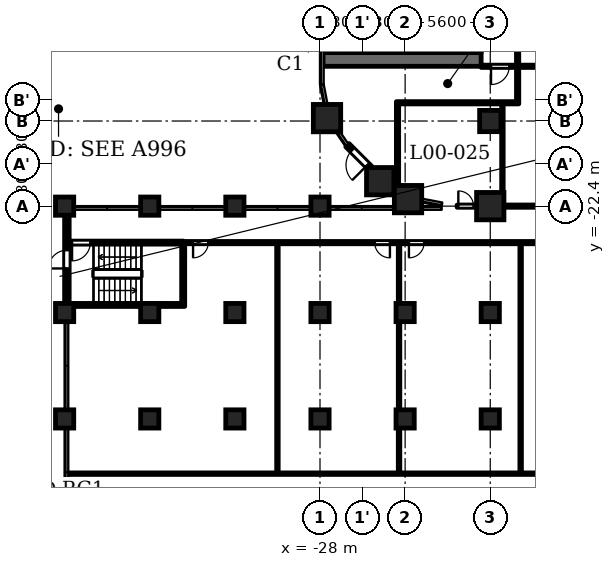
"""IFC4 building model, lengths in metres.
Left out: names, types, materials, properties, quantities, classifications, styles, units other than length and angle.
Written with IfcOpenShell. Run it as: python <this file> out.ifc"""

import sys

from ifc_helpers import new_model, si_unit, direction, frame, frame_2d, origin, origin_2d, place, context, subcontext, project, spatial, polyline, rectangle, circle, outline, extrude, element, fill, save


model = new_model("IFC4")
c1 = context("Model", 3, precision=1e-05, world=origin(), true_north=direction((0.0, 1.0)))
c2 = subcontext(c1, "Body", "Model", "MODEL_VIEW")
j1 = project(units=[si_unit("LENGTHUNIT", "METRE"), si_unit("PLANEANGLEUNIT", "RADIAN")], contexts=[c1])
p1 = place(None, origin())
s1 = spatial("IfcSite", under=j1, at=p1, CompositionType="ELEMENT")
p2 = place(p1, origin())
s2 = spatial("IfcBuilding", under=s1, at=p2, CompositionType="ELEMENT")
p3 = place(p2, origin())
s3 = spatial("IfcBuildingStorey", under=s2, at=p3, CompositionType="ELEMENT", Elevation=0.0)
for number, where, z_axis, x_axis in (
    (1, (-22.209, -21.938, 0.0), (0.0, 0.0, 1.0), (1.0, 0.0, 0.0)),
    (2, (-16.8, -22.4, 0.0), (0.0, 0.0, 1.0), (1.0, 0.0, 0.0)),
    (3, (-27.538, -16.609, 0.0), (0.0, 0.0, 1.0), (1.0, 0.0, 0.0)),
    (4, (-24.04, -20.76, 0.0), (0.0, 0.0, 1.0), (1.0, 0.0, 0.0)),
):
    element("IfcColumn", number, at=place(p3, frame(where, z_axis=z_axis, x_axis=x_axis)), inside=s3, PredefinedType="COLUMN", context=c2, shape_type="SweptSolid", body=[
        extrude(rectangle(XDim=1.8, YDim=1.8, at=origin_2d()), origin(), (0.0, 0.0, 1.0), 6.5),
    ])
p4 = place(p3, frame((-16.8, -16.8, 0.0), z_axis=(0.0, 0.0, 1.0), x_axis=(1.0, 0.0, 0.0)))
e5 = element("IfcColumn", 5, at=p4, inside=s3, PredefinedType="COLUMN", context=c2, shape_type="SweptSolid", body=[
    extrude(rectangle(XDim=1.4, YDim=1.4, at=origin_2d()), origin(), (0.0, 0.0, 1.0), 6.5),
])
for number, where, z_axis, x_axis in (
    (6, (-44.8, -29.4, 0.0), (0.0, 0.0, 1.0), (1.0, 0.0, 0.0)),
    (7, (-39.2, -29.4, 0.0), (0.0, 0.0, 1.0), (1.0, 0.0, 0.0)),
    (8, (-33.6, -29.4, 0.0), (0.0, 0.0, 1.0), (1.0, 0.0, 0.0)),
    (9, (-28.0, -29.4, 0.0), (0.0, 0.0, 1.0), (1.0, 0.0, 0.0)),
    (10, (-22.4, -29.4, 0.0), (0.0, 0.0, 1.0), (1.0, 0.0, 0.0)),
    (11, (-16.8, -29.4, 0.0), (0.0, 0.0, 1.0), (1.0, 0.0, 0.0)),
    (12, (-44.8, -36.4, 0.0), (0.0, 0.0, 1.0), (1.0, 0.0, 0.0)),
    (13, (-39.2, -36.4, 0.0), (0.0, 0.0, 1.0), (1.0, 0.0, 0.0)),
    (14, (-33.6, -36.4, 0.0), (0.0, 0.0, 1.0), (1.0, 0.0, 0.0)),
    (15, (-28.0, -36.4, 0.0), (0.0, 0.0, 1.0), (1.0, 0.0, 0.0)),
    (16, (-22.4, -36.4, 0.0), (0.0, 0.0, 1.0), (1.0, 0.0, 0.0)),
    (17, (-16.8, -36.4, 0.0), (0.0, 0.0, 1.0), (1.0, 0.0, 0.0)),
    (18, (-44.8, -22.4, 0.0), (0.0, 0.0, 1.0), (1.0, 0.0, 0.0)),
    (19, (-39.2, -22.4, 0.0), (0.0, 0.0, 1.0), (1.0, 0.0, 0.0)),
    (20, (-33.6, -22.4, 0.0), (0.0, 0.0, 1.0), (1.0, 0.0, 0.0)),
    (21, (-28.0, -22.4, 0.0), (0.0, 0.0, 1.0), (1.0, 0.0, 0.0)),
):
    element("IfcColumn", number, at=place(p3, frame(where, z_axis=z_axis, x_axis=x_axis)), inside=s3, PredefinedType="COLUMN", context=c2, shape_type="SweptSolid", body=[
        extrude(circle(Radius=0.6, at=origin_2d()), origin(), (0.0, 0.0, 1.0), 6.5),
    ])
p5 = place(p3, frame((-24.571, -20.017, 0.0), z_axis=(0.0, 0.0, 1.0), x_axis=(-0.707053705054, 0.707159853336, 0.0)))
e22 = element("IfcWall", 22, at=p5, inside=s3, PredefinedType="SOLIDWALL", context=c2, shape_type="SweptSolid", body=[
    extrude(rectangle(XDim=2.3, YDim=0.3, at=frame_2d((1.15, 0.0))), origin(), (0.0, 0.0, 1.0), 5.25),
])
p6 = place(p5, frame((0.45, 0.0, 0.0)))
e23 = element("IfcOpeningElement", 23, at=p6, cuts=e22, PredefinedType="OPENING", context=c2, shape_type="SweptSolid", body=[
    extrude(rectangle(XDim=1.4, YDim=2.1, at=frame_2d((0.7, 1.05))), frame((0.0, 0.16, 0.0), z_axis=(0.0, -1.0, 0.0), x_axis=(1.0, 0.0, 0.0)), (0.0, 0.0, 1.0), 0.32),
])
p7 = place(p3, frame((-44.65, -28.8, 0.0), z_axis=(0.0, 0.0, 1.0), x_axis=(0.0, 1.0, 0.0)))
e24 = element("IfcWall", 24, at=p7, inside=s3, PredefinedType="SOLIDWALL", context=c2, shape_type="SweptSolid", body=[
    extrude(rectangle(XDim=5.8, YDim=0.3, at=frame_2d((2.9, 0.0))), origin(), (0.0, 0.0, 1.0), 5.35),
])
p8 = place(p7, frame((2.3, 0.0, 0.0)))
e25 = element("IfcOpeningElement", 25, at=p8, cuts=e24, PredefinedType="OPENING", context=c2, shape_type="SweptSolid", body=[
    extrude(rectangle(XDim=1.2, YDim=2.1, at=frame_2d((0.6, 1.05))), frame((0.0, 0.16, 0.0), z_axis=(0.0, -1.0, 0.0), x_axis=(1.0, 0.0, 0.0)), (0.0, 0.0, 1.0), 0.32),
])
p9 = place(p3, frame((-17.4, -12.75, 0.0), z_axis=(0.0, 0.0, 1.0), x_axis=(-1.0, 0.0, 0.0)))
e26 = element("IfcWall", 26, at=p9, inside=s3, PredefinedType="SHEAR", context=c2, shape_type="SweptSolid", body=[
    extrude(rectangle(XDim=10.4, YDim=0.9, at=frame_2d((5.2, 0.0))), origin(), (0.0, 0.0, 1.0), 6.15),
])
p10 = place(p3, frame((-17.6, -12.3, 0.0), z_axis=(0.0, 0.0, 1.0), x_axis=(0.0, 1.0, 0.0)))
e27 = element("IfcWall", 27, at=p10, inside=s3, PredefinedType="SHEAR", context=c2, shape_type="SweptSolid", body=[
    extrude(rectangle(XDim=24.6, YDim=0.4, at=frame_2d((12.3, 0.0))), origin(), (0.0, 0.0, 1.0), 6.15),
])
p11 = place(p10, frame((6.0, 0.0, 0.0)))
e28 = element("IfcOpeningElement", 28, at=p11, cuts=e27, PredefinedType="OPENING", context=c2, shape_type="SweptSolid", body=[
    extrude(rectangle(XDim=1.1, YDim=2.1, at=frame_2d((0.55, 1.05))), frame((0.0, 0.21, 0.0), z_axis=(0.0, -1.0, 0.0), x_axis=(1.0, 0.0, 0.0)), (0.0, 0.0, 1.0), 0.42),
])
p12 = place(p10, frame((8.4, 0.0, 0.0)))
e29 = element("IfcOpeningElement", 29, at=p12, cuts=e27, PredefinedType="OPENING", context=c2, shape_type="SweptSolid", body=[
    extrude(rectangle(XDim=1.1, YDim=2.1, at=frame_2d((0.55, 1.05))), frame((0.0, 0.21, 0.0), z_axis=(0.0, -1.0, 0.0), x_axis=(1.0, 0.0, 0.0)), (0.0, 0.0, 1.0), 0.42),
])
p13 = place(p10, frame((10.8, 0.0, 0.0)))
e30 = element("IfcOpeningElement", 30, at=p13, cuts=e27, PredefinedType="OPENING", context=c2, shape_type="SweptSolid", body=[
    extrude(rectangle(XDim=1.1, YDim=2.1, at=frame_2d((0.55, 1.05))), frame((0.0, 0.21, 0.0), z_axis=(0.0, -1.0, 0.0), x_axis=(1.0, 0.0, 0.0)), (0.0, 0.0, 1.0), 0.42),
])
p14 = place(p10, frame((16.75, 0.0, 0.0)))
e31 = element("IfcOpeningElement", 31, at=p14, cuts=e27, PredefinedType="OPENING", context=c2, shape_type="SweptSolid", body=[
    extrude(rectangle(XDim=0.9, YDim=2.1, at=frame_2d((0.45, 1.05))), frame((0.0, 0.21, 0.0), z_axis=(0.0, -1.0, 0.0), x_axis=(1.0, 0.0, 0.0)), (0.0, 0.0, 1.0), 0.42),
])
p15 = place(p10, frame((22.8, 0.0, 0.0)))
e32 = element("IfcOpeningElement", 32, at=p15, cuts=e27, PredefinedType="OPENING", context=c2, shape_type="SweptSolid", body=[
    extrude(rectangle(XDim=1.1, YDim=2.1, at=frame_2d((0.55, 1.05))), frame((0.0, 0.21, 0.0), z_axis=(0.0, -1.0, 0.0), x_axis=(1.0, 0.0, 0.0)), (0.0, 0.0, 1.0), 0.42),
])
p16 = place(p10, frame((0.7, 0.0, 0.0)))
e33 = element("IfcOpeningElement", 33, at=p16, cuts=e27, PredefinedType="OPENING", context=c2, shape_type="SweptSolid", body=[
    extrude(rectangle(XDim=1.1, YDim=2.1, at=frame_2d((0.55, 1.05))), frame((0.0, 0.21, 0.0), z_axis=(0.0, -1.0, 0.0), x_axis=(1.0, 0.0, 0.0)), (0.0, 0.0, 1.0), 0.42),
])
p17 = place(p10, frame((12.775, 0.0, 0.0)))
e34 = element("IfcOpeningElement", 34, at=p17, cuts=e27, PredefinedType="OPENING", context=c2, shape_type="SweptSolid", body=[
    extrude(rectangle(XDim=1.8, YDim=2.1, at=frame_2d((0.9, 1.05))), frame((0.0, 0.21, 0.0), z_axis=(0.0, -1.0, 0.0), x_axis=(1.0, 0.0, 0.0)), (0.0, 0.0, 1.0), 0.42),
])
p18 = place(p3, frame((-26.55, -12.3, 0.0), z_axis=(0.0, 0.0, 1.0), x_axis=(0.0, 1.0, 0.0)))
e35 = element("IfcWall", 35, at=p18, inside=s3, PredefinedType="SHEAR", context=c2, shape_type="SweptSolid", body=[
    extrude(rectangle(XDim=24.6, YDim=0.9, at=frame_2d((12.3, 0.0))), origin(), (0.0, 0.0, 1.0), 6.15),
])
p19 = place(p3, frame((-23.55, -12.3, 0.0), z_axis=(0.0, 0.0, 1.0), x_axis=(0.0, 1.0, 0.0)))
e36 = element("IfcWall", 36, at=p19, inside=s3, PredefinedType="PARTITIONING", context=c2, shape_type="SweptSolid", body=[
    extrude(rectangle(XDim=2.5, YDim=0.2, at=frame_2d((1.25, 0.0))), origin(), (0.0, 0.0, 1.0), 6.15),
])
p20 = place(p19, frame((0.8, 0.0, 0.0)))
e37 = element("IfcOpeningElement", 37, at=p20, cuts=e36, PredefinedType="OPENING", context=c2, shape_type="SweptSolid", body=[
    extrude(rectangle(XDim=0.9, YDim=2.1, at=frame_2d((0.45, 1.05))), frame((0.0, 0.11, 0.0), z_axis=(0.0, -1.0, 0.0), x_axis=(1.0, 0.0, 0.0)), (0.0, 0.0, 1.0), 0.22),
])
p21 = place(p3, frame((-44.618, -40.0, 0.0), z_axis=(0.0, 0.0, 1.0), x_axis=(1.0, 0.0, 0.0)))
e38 = element("IfcWall", 38, at=p21, inside=s3, PredefinedType="PARTITIONING", context=c2, shape_type="SweptSolid", body=[
    extrude(rectangle(XDim=40.443, YDim=0.1, at=frame_2d((20.221, 0.0))), origin(), (0.0, 0.0, 1.0), 6.15),
])
p22 = place(p3, frame((-44.71, -28.9, 0.0), z_axis=(0.0, 0.0, 1.0), x_axis=(1.0, 0.0, 0.0)))
e39 = element("IfcWall", 39, at=p22, inside=s3, PredefinedType="SHEAR", context=c2, shape_type="SweptSolid", body=[
    extrude(rectangle(XDim=7.81, YDim=0.2, at=frame_2d((3.905, 0.0))), origin(), (0.0, 0.0, 1.0), 6.15),
])
p23 = place(p3, frame((-37.0, -24.8, 0.0), z_axis=(0.0, 0.0, 1.0), x_axis=(1.0, 0.0, 0.0)))
e40 = element("IfcWall", 40, at=p23, inside=s3, PredefinedType="PARTITIONING", context=c2, shape_type="SweptSolid", body=[
    extrude(rectangle(XDim=34.95, YDim=0.15, at=frame_2d((17.475, 0.0))), origin(), (0.0, 0.0, 1.0), 6.15),
])
p24 = place(p23, frame((0.65, 0.0, 0.0)))
e41 = element("IfcOpeningElement", 41, at=p24, cuts=e40, PredefinedType="OPENING", context=c2, shape_type="SweptSolid", body=[
    extrude(rectangle(XDim=1.0, YDim=2.1, at=frame_2d((0.5, 1.05))), frame((0.0, 0.085, 0.0), z_axis=(0.0, -1.0, 0.0), x_axis=(1.0, 0.0, 0.0)), (0.0, 0.0, 1.0), 0.17),
])
p25 = place(p23, frame((12.6, 0.0, 0.0)))
e42 = element("IfcOpeningElement", 42, at=p25, cuts=e40, PredefinedType="OPENING", context=c2, shape_type="SweptSolid", body=[
    extrude(rectangle(XDim=1.0, YDim=2.1, at=frame_2d((0.5, 1.05))), frame((0.0, 0.085, 0.0), z_axis=(0.0, -1.0, 0.0), x_axis=(1.0, 0.0, 0.0)), (0.0, 0.0, 1.0), 0.17),
])
p26 = place(p23, frame((14.85, 0.0, 0.0)))
e43 = element("IfcOpeningElement", 43, at=p26, cuts=e40, PredefinedType="OPENING", context=c2, shape_type="SweptSolid", body=[
    extrude(rectangle(XDim=1.0, YDim=2.1, at=frame_2d((0.5, 1.05))), frame((0.0, 0.085, 0.0), z_axis=(0.0, -1.0, 0.0), x_axis=(1.0, 0.0, 0.0)), (0.0, 0.0, 1.0), 0.17),
])
p27 = place(p23, frame((31.35, 0.0, 0.0)))
e44 = element("IfcOpeningElement", 44, at=p27, cuts=e40, PredefinedType="OPENING", context=c2, shape_type="SweptSolid", body=[
    extrude(rectangle(XDim=1.0, YDim=2.1, at=frame_2d((0.5, 1.05))), frame((0.0, 0.085, 0.0), z_axis=(0.0, -1.0, 0.0), x_axis=(1.0, 0.0, 0.0)), (0.0, 0.0, 1.0), 0.17),
])
p28 = place(p3, frame((-44.71, -24.8, 0.0), z_axis=(0.0, 0.0, 1.0), x_axis=(1.0, 0.0, 0.0)))
e45 = element("IfcWall", 45, at=p28, inside=s3, PredefinedType="SHEAR", context=c2, shape_type="SweptSolid", body=[
    extrude(rectangle(XDim=7.71, YDim=0.2, at=frame_2d((3.855, 0.0))), origin(), (0.0, 0.0, 1.0), 6.15),
])
p29 = place(p28, frame((0.4, 0.0, 0.0)))
e46 = element("IfcOpeningElement", 46, at=p29, cuts=e45, PredefinedType="OPENING", context=c2, shape_type="SweptSolid", body=[
    extrude(rectangle(XDim=1.2, YDim=2.1, at=frame_2d((0.6, 1.05))), frame((0.0, 0.11, 0.0), z_axis=(0.0, -1.0, 0.0), x_axis=(1.0, 0.0, 0.0)), (0.0, 0.0, 1.0), 0.22),
])
p30 = place(p3, frame((-18.98, -22.4, 0.0), z_axis=(0.0, 0.0, 1.0), x_axis=(1.0, 0.0, 0.0)))
e47 = element("IfcWall", 47, at=p30, inside=s3, PredefinedType="PARTITIONING", context=c2, shape_type="SweptSolid", body=[
    extrude(rectangle(XDim=37.961, YDim=0.15, at=frame_2d((18.98, 0.0))), origin(), (0.0, 0.0, 1.0), 5.25),
])
p31 = place(p30, frame((15.13, 0.0, 0.0)))
e48 = element("IfcOpeningElement", 48, at=p31, cuts=e47, PredefinedType="OPENING", context=c2, shape_type="SweptSolid", body=[
    extrude(rectangle(XDim=1.2, YDim=2.1, at=frame_2d((0.6, 1.05))), frame((0.0, 0.085, 0.0), z_axis=(0.0, -1.0, 0.0), x_axis=(1.0, 0.0, 0.0)), (0.0, 0.0, 1.0), 0.17),
])
p32 = place(p30, frame((0.08, 0.0, 0.0)))
e49 = element("IfcOpeningElement", 49, at=p32, cuts=e47, PredefinedType="OPENING", context=c2, shape_type="SweptSolid", body=[
    extrude(rectangle(XDim=1.0, YDim=2.1, at=frame_2d((0.5, 1.05))), frame((0.0, 0.085, 0.0), z_axis=(0.0, -1.0, 0.0), x_axis=(1.0, 0.0, 0.0)), (0.0, 0.0, 1.0), 0.17),
])
p33 = place(p30, frame((11.33, 0.0, 0.0)))
e50 = element("IfcOpeningElement", 50, at=p33, cuts=e47, PredefinedType="OPENING", context=c2, shape_type="SweptSolid", body=[
    extrude(rectangle(XDim=1.0, YDim=2.1, at=frame_2d((0.5, 1.05))), frame((0.0, 0.085, 0.0), z_axis=(0.0, -1.0, 0.0), x_axis=(1.0, 0.0, 0.0)), (0.0, 0.0, 1.0), 0.17),
])
p34 = place(p30, frame((25.68, 0.0, 0.0)))
e51 = element("IfcOpeningElement", 51, at=p34, cuts=e47, PredefinedType="OPENING", context=c2, shape_type="SweptSolid", body=[
    extrude(rectangle(XDim=0.9, YDim=2.1, at=frame_2d((0.45, 1.05))), frame((0.0, 0.085, 0.0), z_axis=(0.0, -1.0, 0.0), x_axis=(1.0, 0.0, 0.0)), (0.0, 0.0, 1.0), 0.17),
])
p35 = place(p30, frame((28.18, 0.0, 0.0)))
e52 = element("IfcOpeningElement", 52, at=p35, cuts=e47, PredefinedType="OPENING", context=c2, shape_type="SweptSolid", body=[
    extrude(rectangle(XDim=0.9, YDim=2.1, at=frame_2d((0.45, 1.05))), frame((0.0, 0.085, 0.0), z_axis=(0.0, -1.0, 0.0), x_axis=(1.0, 0.0, 0.0)), (0.0, 0.0, 1.0), 0.17),
])
p36 = place(p30, frame((31.68, 0.0, 0.0)))
e53 = element("IfcOpeningElement", 53, at=p36, cuts=e47, PredefinedType="OPENING", context=c2, shape_type="SweptSolid", body=[
    extrude(rectangle(XDim=0.9, YDim=2.1, at=frame_2d((0.45, 1.05))), frame((0.0, 0.085, 0.0), z_axis=(0.0, -1.0, 0.0), x_axis=(1.0, 0.0, 0.0)), (0.0, 0.0, 1.0), 0.17),
])
p37 = place(p30, frame((36.881, 0.0, 0.0)))
e54 = element("IfcOpeningElement", 54, at=p37, cuts=e47, PredefinedType="OPENING", context=c2, shape_type="SweptSolid", body=[
    extrude(rectangle(XDim=1.0, YDim=2.1, at=frame_2d((0.5, 1.05))), frame((0.0, 0.085, 0.0), z_axis=(0.0, -1.0, 0.0), x_axis=(1.0, 0.0, 0.0)), (0.0, 0.0, 1.0), 0.17),
])
p38 = place(p3, frame((-22.975, -15.6, 0.0), z_axis=(0.0, 0.0, 1.0), x_axis=(1.0, 0.0, 0.0)))
e55 = element("IfcWall", 55, at=p38, inside=s3, PredefinedType="PARTITIONING", context=c2, shape_type="SweptSolid", body=[
    extrude(rectangle(XDim=8.05, YDim=0.15, at=frame_2d((4.025, 0.0))), origin(), (0.0, 0.0, 1.0), 6.15),
])
p39 = place(p3, frame((-17.4, -13.2, 0.0), z_axis=(0.0, 0.0, 1.0), x_axis=(1.0, 0.0, 0.0)))
e56 = element("IfcWall", 56, at=p39, inside=s3, PredefinedType="PARTITIONING", context=c2, shape_type="SweptSolid", body=[
    extrude(rectangle(XDim=34.8, YDim=0.15, at=frame_2d((17.4, 0.0))), origin(), (0.0, 0.0, 1.0), 6.15),
])
p40 = place(p39, frame((13.95, 0.0, 0.0)))
e57 = element("IfcOpeningElement", 57, at=p40, cuts=e56, PredefinedType="OPENING", context=c2, shape_type="SweptSolid", body=[
    extrude(rectangle(XDim=1.8, YDim=2.1, at=frame_2d((0.9, 1.05))), frame((0.0, 0.085, 0.0), z_axis=(0.0, -1.0, 0.0), x_axis=(1.0, 0.0, 0.0)), (0.0, 0.0, 1.0), 0.17),
])
p41 = place(p39, frame((33.05, 0.0, 0.0)))
e58 = element("IfcOpeningElement", 58, at=p41, cuts=e56, PredefinedType="OPENING", context=c2, shape_type="SweptSolid", body=[
    extrude(rectangle(XDim=1.2, YDim=2.1, at=frame_2d((0.6, 1.05))), frame((0.0, 0.085, 0.0), z_axis=(0.0, -1.0, 0.0), x_axis=(1.0, 0.0, 0.0)), (0.0, 0.0, 1.0), 0.17),
])
p42 = place(p39, frame((0.65, 0.0, 0.0)))
e59 = element("IfcOpeningElement", 59, at=p42, cuts=e56, PredefinedType="OPENING", context=c2, shape_type="SweptSolid", body=[
    extrude(rectangle(XDim=1.2, YDim=2.1, at=frame_2d((0.6, 1.05))), frame((0.0, 0.085, 0.0), z_axis=(0.0, -1.0, 0.0), x_axis=(1.0, 0.0, 0.0)), (0.0, 0.0, 1.0), 0.17),
])
p43 = place(p3, frame((-37.0, -28.8, 0.0), z_axis=(0.0, 0.0, 1.0), x_axis=(0.0, 1.0, 0.0)))
e60 = element("IfcWall", 60, at=p43, inside=s3, PredefinedType="SHEAR", context=c2, shape_type="SweptSolid", body=[
    extrude(rectangle(XDim=3.925, YDim=0.2, at=frame_2d((1.962, 0.0))), origin(), (0.0, 0.0, 1.0), 6.15),
])
p44 = place(p3, frame((-30.8, -39.95, 0.0), z_axis=(0.0, 0.0, 1.0), x_axis=(0.0, 1.0, 0.0)))
e61 = element("IfcWall", 61, at=p44, inside=s3, PredefinedType="PARTITIONING", context=c2, shape_type="SweptSolid", body=[
    extrude(rectangle(XDim=15.075, YDim=0.1, at=frame_2d((7.538, 0.0))), origin(), (0.0, 0.0, 1.0), 6.15),
])
p45 = place(p3, frame((-22.9, -21.37, 0.0), z_axis=(0.0, 0.0, 1.0), x_axis=(0.0, 1.0, 0.0)))
e62 = element("IfcWall", 62, at=p45, inside=s3, PredefinedType="PARTITIONING", context=c2, shape_type="SweptSolid", body=[
    extrude(rectangle(XDim=5.695, YDim=0.15, at=frame_2d((2.848, 0.0))), origin(), (0.0, 0.0, 1.0), 6.15),
])
p46 = place(p3, frame((-22.8, -39.95, 0.0), z_axis=(0.0, 0.0, 1.0), x_axis=(0.0, 1.0, 0.0)))
e63 = element("IfcWall", 63, at=p46, inside=s3, PredefinedType="PARTITIONING", context=c2, shape_type="SweptSolid", body=[
    extrude(rectangle(XDim=15.075, YDim=0.1, at=frame_2d((7.538, 0.0))), origin(), (0.0, 0.0, 1.0), 6.15),
])
p47 = place(p3, frame((-16.0, -22.325, 0.0), z_axis=(0.0, 0.0, 1.0), x_axis=(0.0, 1.0, 0.0)))
e64 = element("IfcWall", 64, at=p47, inside=s3, PredefinedType="PARTITIONING", context=c2, shape_type="SweptSolid", body=[
    extrude(rectangle(XDim=6.65, YDim=0.1, at=frame_2d((3.325, 0.0))), origin(), (0.0, 0.0, 1.0), 6.15),
])
p48 = place(p3, frame((-15.0, -15.525, 0.0), z_axis=(0.0, 0.0, 1.0), x_axis=(0.0, 1.0, 0.0)))
e65 = element("IfcWall", 65, at=p48, inside=s3, PredefinedType="PARTITIONING", context=c2, shape_type="SweptSolid", body=[
    extrude(rectangle(XDim=2.25, YDim=0.15, at=frame_2d((1.125, 0.0))), origin(), (0.0, 0.0, 1.0), 6.15),
])
p49 = place(p3, frame((-15.0, -13.125, 0.0), z_axis=(0.0, 0.0, 1.0), x_axis=(0.0, 1.0, 0.0)))
e66 = element("IfcWall", 66, at=p49, inside=s3, PredefinedType="PARTITIONING", context=c2, shape_type="SweptSolid", body=[
    extrude(rectangle(XDim=6.356, YDim=0.15, at=frame_2d((3.178, 0.0))), origin(), (0.0, 0.0, 1.0), 6.15),
])
p50 = place(p3, frame((-14.8, -39.95, 0.0), z_axis=(0.0, 0.0, 1.0), x_axis=(0.0, 1.0, 0.0)))
e67 = element("IfcWall", 67, at=p50, inside=s3, PredefinedType="PARTITIONING", context=c2, shape_type="SweptSolid", body=[
    extrude(rectangle(XDim=15.075, YDim=0.1, at=frame_2d((7.538, 0.0))), origin(), (0.0, 0.0, 1.0), 6.15),
])
p51 = place(p3, origin())
e68 = element("IfcWall", 68, at=p51, inside=s3, PredefinedType="SOLIDWALL", context=c2, shape_type="SweptSolid", body=[
    extrude(outline(polyline([(-20.0, -22.7), (-19.0, -22.7), (-19.0, -22.285), (-19.944, -22.105), (-20.0, -22.4), (-20.0, -22.7)])), origin(), (0.0, 0.0, 1.0), 5.25),
])
p52 = place(p6, origin())
e69 = element("IfcDoor", 69, at=p52, inside=s3, OperationType="SINGLE_SWING_LEFT", PredefinedType="DOOR", context=c2, shape_type="SweptSolid", body=[
    extrude(rectangle(XDim=1.4, YDim=2.1, at=frame_2d((0.7, 1.05))), frame((0.0, 0.025, 0.0), z_axis=(0.0, -1.0, 0.0), x_axis=(1.0, 0.0, 0.0)), (0.0, 0.0, 1.0), 0.05),
])
fill(e23, e69)
p53 = place(p8, origin())
e70 = element("IfcDoor", 70, at=p53, inside=s3, OperationType="SINGLE_SWING_LEFT", PredefinedType="DOOR", context=c2, shape_type="SweptSolid", body=[
    extrude(rectangle(XDim=1.2, YDim=2.1, at=frame_2d((0.6, 1.05))), frame((0.0, 0.025, 0.0), z_axis=(0.0, -1.0, 0.0), x_axis=(1.0, 0.0, 0.0)), (0.0, 0.0, 1.0), 0.05),
])
fill(e25, e70)
p54 = place(p29, origin())
e71 = element("IfcDoor", 71, at=p54, inside=s3, OperationType="SINGLE_SWING_LEFT", PredefinedType="DOOR", context=c2, shape_type="SweptSolid", body=[
    extrude(rectangle(XDim=1.2, YDim=2.1, at=frame_2d((0.6, 1.05))), frame((0.0, 0.025, 0.0), z_axis=(0.0, -1.0, 0.0), x_axis=(1.0, 0.0, 0.0)), (0.0, 0.0, 1.0), 0.05),
])
fill(e46, e71)
p55 = place(p24, origin())
e72 = element("IfcDoor", 72, at=p55, inside=s3, OperationType="SINGLE_SWING_LEFT", PredefinedType="DOOR", context=c2, shape_type="SweptSolid", body=[
    extrude(rectangle(XDim=1.0, YDim=2.1, at=frame_2d((0.5, 1.05))), frame((0.0, 0.025, 0.0), z_axis=(0.0, -1.0, 0.0), x_axis=(1.0, 0.0, 0.0)), (0.0, 0.0, 1.0), 0.05),
])
fill(e41, e72)
p56 = place(p25, origin())
e73 = element("IfcDoor", 73, at=p56, inside=s3, OperationType="SINGLE_SWING_RIGHT", PredefinedType="DOOR", context=c2, shape_type="SweptSolid", body=[
    extrude(rectangle(XDim=1.0, YDim=2.1, at=frame_2d((0.5, 1.05))), frame((0.0, 0.025, 0.0), z_axis=(0.0, -1.0, 0.0), x_axis=(1.0, 0.0, 0.0)), (0.0, 0.0, 1.0), 0.05),
])
fill(e42, e73)
p57 = place(p26, origin())
e74 = element("IfcDoor", 74, at=p57, inside=s3, OperationType="SINGLE_SWING_LEFT", PredefinedType="DOOR", context=c2, shape_type="SweptSolid", body=[
    extrude(rectangle(XDim=1.0, YDim=2.1, at=frame_2d((0.5, 1.05))), frame((0.0, 0.025, 0.0), z_axis=(0.0, -1.0, 0.0), x_axis=(1.0, 0.0, 0.0)), (0.0, 0.0, 1.0), 0.05),
])
fill(e43, e74)
p58 = place(p42, origin())
e75 = element("IfcDoor", 75, at=p58, inside=s3, OperationType="SINGLE_SWING_LEFT", PredefinedType="DOOR", context=c2, shape_type="SweptSolid", body=[
    extrude(rectangle(XDim=1.2, YDim=2.1, at=frame_2d((0.6, 1.05))), frame((0.0, 0.025, 0.0), z_axis=(0.0, -1.0, 0.0), x_axis=(1.0, 0.0, 0.0)), (0.0, 0.0, 1.0), 0.05),
])
fill(e59, e75)
p59 = place(p32, origin())
e76 = element("IfcDoor", 76, at=p59, inside=s3, OperationType="SINGLE_SWING_RIGHT", PredefinedType="DOOR", context=c2, shape_type="SweptSolid", body=[
    extrude(rectangle(XDim=1.0, YDim=2.1, at=frame_2d((0.5, 1.05))), frame((0.0, 0.025, 0.0), z_axis=(0.0, -1.0, 0.0), x_axis=(1.0, 0.0, 0.0)), (0.0, 0.0, 1.0), 0.05),
])
fill(e49, e76)
save(model, sys.argv[1])
